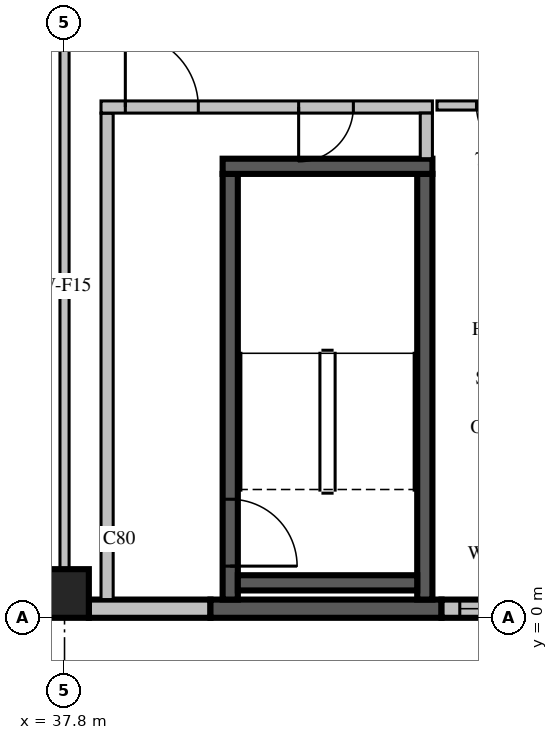
"""IFC4 building model, lengths in metres.
Left out: names, types, materials, properties, quantities, classifications, styles, units other than length and angle.
Written with IfcOpenShell. Run it as: python <this file> out.ifc"""

import sys

from ifc_helpers import new_model, si_unit, direction, frame, frame_2d, origin, origin_2d, place, context, subcontext, project, spatial, rectangle, extrude, source, transform, mapped, element, fill, save


model = new_model("IFC4")
c1 = context("Model", 3, precision=1e-05, world=origin(), true_north=direction((0.0, 1.0)))
c2 = subcontext(c1, "Body", "Model", "MODEL_VIEW")
j1 = project(units=[si_unit("LENGTHUNIT", "METRE"), si_unit("PLANEANGLEUNIT", "RADIAN")], contexts=[c1])
p1 = place(None, origin())
s1 = spatial("IfcSite", under=j1, at=p1, CompositionType="ELEMENT")
p2 = place(p1, origin())
s2 = spatial("IfcBuilding", under=s1, at=p2, CompositionType="ELEMENT")
p3 = place(p2, frame((0.0, 0.0, 242.4)))
s3 = spatial("IfcBuildingStorey", under=s2, at=p3, CompositionType="ELEMENT", Elevation=242.4)
m1 = source(origin(), c2, "Body", "SweptSolid", [
    extrude(rectangle(XDim=0.8, YDim=0.8, at=origin_2d()), origin(), (0.0, 0.0, 1.0), 3.8),
])
p4 = place(p3, frame((37.8, 0.4, 0.0), z_axis=(0.0, 0.0, 1.0), x_axis=(1.0, 0.0, 0.0)))
e1 = element("IfcColumn", 1, at=p4, inside=s3, PredefinedType="COLUMN", context=c2, shape_type="MappedRepresentation", body=[
    mapped(m1, transform((0.0, 0.0, 0.0), scale=1.0)),
])
m2 = source(origin(), c2, "Body", "SweptSolid", [
    extrude(rectangle(XDim=2.0, YDim=0.3, at=frame_2d((1.0, 0.0))), origin(), (0.0, 0.0, 1.0), 3.4),
])
p5 = place(p3, frame((38.2, 0.15, 0.0), z_axis=(0.0, 0.0, 1.0), x_axis=(1.0, 0.0, 0.0)))
e2 = element("IfcWall", 2, at=p5, inside=s3, PredefinedType="STANDARD", context=c2, shape_type="MappedRepresentation", body=[
    mapped(m2, transform((0.0, 0.0, 0.0), scale=1.0)),
])
m3 = source(origin(), c2, "Body", "SweptSolid", [
    extrude(rectangle(XDim=3.8, YDim=0.3, at=frame_2d((1.9, 0.0))), origin(), (0.0, 0.0, 1.0), 3.4),
])
p6 = place(p3, frame((40.2, 0.15, 0.0), z_axis=(0.0, 0.0, 1.0), x_axis=(1.0, 0.0, 0.0)))
e3 = element("IfcWall", 3, at=p6, inside=s3, PredefinedType="SOLIDWALL", context=c2, shape_type="MappedRepresentation", body=[
    mapped(m3, transform((0.0, 0.0, 0.0), scale=1.0)),
])
m4 = source(origin(), c2, "Body", "SweptSolid", [
    extrude(rectangle(XDim=1.8, YDim=0.3, at=frame_2d((0.9, 0.0))), origin(), (0.0, 0.0, 1.0), 3.4),
])
p7 = place(p3, frame((44.0, 0.15, 0.0), z_axis=(0.0, 0.0, 1.0), x_axis=(1.0, 0.0, 0.0)))
e4 = element("IfcWall", 4, at=p7, inside=s3, PredefinedType="STANDARD", context=c2, shape_type="MappedRepresentation", body=[
    mapped(m4, transform((0.0, 0.0, 0.0), scale=1.0)),
])
m5 = source(origin(), c2, "Body", "SweptSolid", [
    extrude(rectangle(XDim=1.2, YDim=2.3, at=frame_2d((0.6, 1.15))), frame((0.0, 0.16, 0.0), z_axis=(0.0, -1.0, 0.0), x_axis=(1.0, 0.0, 0.0)), (0.0, 0.0, 1.0), 0.32),
])
p8 = place(p7, frame((0.3, 0.0, 0.6)))
e5 = element("IfcOpeningElement", 5, at=p8, cuts=e4, PredefinedType="OPENING", context=c2, shape_type="MappedRepresentation", body=[
    mapped(m5, transform((0.0, 0.0, 0.0), scale=1.0)),
])
m6 = source(origin(), c2, "Body", "SweptSolid", [
    extrude(rectangle(XDim=7.0, YDim=0.25, at=frame_2d((3.5, 0.0))), origin(), (0.0, 0.0, 1.0), 3.4),
])
p9 = place(p3, frame((40.525, 0.3, 0.0), z_axis=(0.0, 0.0, 1.0), x_axis=(0.0, 1.0, 0.0)))
e6 = element("IfcWall", 6, at=p9, inside=s3, PredefinedType="SOLIDWALL", context=c2, shape_type="MappedRepresentation", body=[
    mapped(m6, transform((0.0, 0.0, 0.0), scale=1.0)),
])
m7 = source(origin(), c2, "Body", "SweptSolid", [
    extrude(rectangle(XDim=1.1, YDim=2.1, at=frame_2d((0.55, 1.05))), frame((0.0, 0.135, 0.0), z_axis=(0.0, -1.0, 0.0), x_axis=(1.0, 0.0, 0.0)), (0.0, 0.0, 1.0), 0.27),
])
p10 = place(p9, frame((0.55, 0.0, 0.0)))
e7 = element("IfcOpeningElement", 7, at=p10, cuts=e6, PredefinedType="OPENING", context=c2, shape_type="MappedRepresentation", body=[
    mapped(m7, transform((0.0, 0.0, 0.0), scale=1.0)),
])
p11 = place(p3, frame((43.725, 0.3, 0.0), z_axis=(0.0, 0.0, 1.0), x_axis=(0.0, 1.0, 0.0)))
e8 = element("IfcWall", 8, at=p11, inside=s3, PredefinedType="SOLIDWALL", context=c2, shape_type="MappedRepresentation", body=[
    mapped(m6, transform((0.0, 0.0, 0.0), scale=1.0)),
])
m8 = source(origin(), c2, "Body", "SweptSolid", [
    extrude(rectangle(XDim=3.45, YDim=0.25, at=frame_2d((1.725, 0.0))), origin(), (0.0, 0.0, 1.0), 3.4),
])
p12 = place(p3, frame((40.4, 7.425, 0.0), z_axis=(0.0, 0.0, 1.0), x_axis=(1.0, 0.0, 0.0)))
e9 = element("IfcWall", 9, at=p12, inside=s3, PredefinedType="SOLIDWALL", context=c2, shape_type="MappedRepresentation", body=[
    mapped(m8, transform((0.0, 0.0, 0.0), scale=1.0)),
])
m9 = source(origin(), c2, "Body", "SweptSolid", [
    extrude(rectangle(XDim=2.95, YDim=0.25, at=frame_2d((1.475, 0.0))), origin(), (0.0, 0.0, 1.0), 3.4),
])
p13 = place(p3, frame((40.65, 0.575, 0.0), z_axis=(0.0, 0.0, 1.0), x_axis=(1.0, 0.0, 0.0)))
e10 = element("IfcWall", 10, at=p13, inside=s3, PredefinedType="SOLIDWALL", context=c2, shape_type="MappedRepresentation", body=[
    mapped(m9, transform((0.0, 0.0, 0.0), scale=1.0)),
])
m10 = source(origin(), c2, "Body", "SweptSolid", [
    extrude(rectangle(XDim=8.0, YDim=0.2, at=frame_2d((4.0, 0.0))), origin(), (0.0, 0.0, 1.0), 3.4),
])
p14 = place(p3, frame((38.5, 0.3, 0.0), z_axis=(0.0, 0.0, 1.0), x_axis=(0.0, 1.0, 0.0)))
e11 = element("IfcWall", 11, at=p14, inside=s3, PredefinedType="PARTITIONING", context=c2, shape_type="MappedRepresentation", body=[
    mapped(m10, transform((0.0, 0.0, 0.0), scale=1.0)),
])
m11 = source(origin(), c2, "Body", "SweptSolid", [
    extrude(rectangle(XDim=5.45, YDim=0.2, at=frame_2d((2.725, 0.0))), origin(), (0.0, 0.0, 1.0), 3.4),
])
p15 = place(p3, frame((38.4, 8.4, 0.0), z_axis=(0.0, 0.0, 1.0), x_axis=(1.0, 0.0, 0.0)))
e12 = element("IfcWall", 12, at=p15, inside=s3, PredefinedType="PARTITIONING", context=c2, shape_type="MappedRepresentation", body=[
    mapped(m11, transform((0.0, 0.0, 0.0), scale=1.0)),
])
m12 = source(origin(), c2, "Body", "SweptSolid", [
    extrude(rectangle(XDim=1.2, YDim=2.1, at=frame_2d((0.6, 1.05))), frame((0.0, 0.11, 0.0), z_axis=(0.0, -1.0, 0.0), x_axis=(1.0, 0.0, 0.0)), (0.0, 0.0, 1.0), 0.22),
])
p16 = place(p15, frame((0.4, 0.0, 0.0)))
e13 = element("IfcOpeningElement", 13, at=p16, cuts=e12, PredefinedType="OPENING", context=c2, shape_type="MappedRepresentation", body=[
    mapped(m12, transform((0.0, 0.0, 0.0), scale=1.0)),
])
m13 = source(origin(), c2, "Body", "SweptSolid", [
    extrude(rectangle(XDim=0.9, YDim=2.1, at=frame_2d((0.45, 1.05))), frame((0.0, 0.11, 0.0), z_axis=(0.0, -1.0, 0.0), x_axis=(1.0, 0.0, 0.0)), (0.0, 0.0, 1.0), 0.22),
])
p17 = place(p15, frame((3.25, 0.0, 0.0)))
e14 = element("IfcOpeningElement", 14, at=p17, cuts=e12, PredefinedType="OPENING", context=c2, shape_type="MappedRepresentation", body=[
    mapped(m13, transform((0.0, 0.0, 0.0), scale=1.0)),
])
m14 = source(origin(), c2, "Body", "SweptSolid", [
    extrude(rectangle(XDim=0.75, YDim=0.2, at=frame_2d((0.375, 0.0))), origin(), (0.0, 0.0, 1.0), 3.4),
])
p18 = place(p3, frame((43.75, 7.55, 0.0), z_axis=(0.0, 0.0, 1.0), x_axis=(0.0, 1.0, 0.0)))
e15 = element("IfcWall", 15, at=p18, inside=s3, PredefinedType="PARTITIONING", context=c2, shape_type="MappedRepresentation", body=[
    mapped(m14, transform((0.0, 0.0, 0.0), scale=1.0)),
])
m15 = source(origin(), c2, "Body", "SweptSolid", [
    extrude(rectangle(XDim=2.2, YDim=0.15, at=frame_2d((1.1, 0.0))), origin(), (0.0, 0.0, 1.0), 3.4),
])
p19 = place(p3, frame((46.125, 8.425, 0.0), z_axis=(0.0, 0.0, 1.0), x_axis=(-1.0, 0.0, 0.0)))
e16 = element("IfcWall", 16, at=p19, inside=s3, PredefinedType="PARTITIONING", context=c2, shape_type="MappedRepresentation", body=[
    mapped(m15, transform((0.0, 0.0, 0.0), scale=1.0)),
])
m16 = source(origin(), c2, "Body", "SweptSolid", [
    extrude(rectangle(XDim=0.9, YDim=2.1, at=frame_2d((0.45, 1.05))), frame((0.0, 0.085, 0.0), z_axis=(0.0, -1.0, 0.0), x_axis=(1.0, 0.0, 0.0)), (0.0, 0.0, 1.0), 0.17),
])
p20 = place(p19, frame((0.65, 0.0, 0.0)))
e17 = element("IfcOpeningElement", 17, at=p20, cuts=e16, PredefinedType="OPENING", context=c2, shape_type="MappedRepresentation", body=[
    mapped(m16, transform((0.0, 0.0, 0.0), scale=1.0)),
])
m17 = source(origin(), c2, "Body", "SweptSolid", [
    extrude(rectangle(XDim=9.302, YDim=0.15, at=frame_2d((4.651, 0.0))), origin(), (0.0, 0.0, 1.0), 3.4),
])
p21 = place(p3, frame((37.8, 0.799, 0.0), z_axis=(0.0, 0.0, 1.0), x_axis=(0.0, 1.0, 0.0)))
e18 = element("IfcWall", 18, at=p21, inside=s3, PredefinedType="PARTITIONING", context=c2, shape_type="MappedRepresentation", body=[
    mapped(m17, transform((0.0, 0.0, 0.0), scale=1.0)),
])
m18 = source(origin(), c2, "Body", "SweptSolid", [
    extrude(rectangle(XDim=1.2, YDim=2.3, at=frame_2d((0.6, 1.15))), frame((0.0, 0.03, 0.0), z_axis=(0.0, -1.0, 0.0), x_axis=(1.0, 0.0, 0.0)), (0.0, 0.0, 1.0), 0.06),
])
p22 = place(p8, origin())
e19 = element("IfcWindow", 19, at=p22, inside=s3, PartitioningType="SINGLE_PANEL", PredefinedType="WINDOW", context=c2, shape_type="MappedRepresentation", body=[
    mapped(m18, transform((0.0, 0.0, 0.0), scale=1.0)),
])
fill(e5, e19)
m19 = source(origin(), c2, "Body", "SweptSolid", [
    extrude(rectangle(XDim=1.1, YDim=2.1, at=frame_2d((0.55, 1.05))), frame((0.0, 0.025, 0.0), z_axis=(0.0, -1.0, 0.0), x_axis=(1.0, 0.0, 0.0)), (0.0, 0.0, 1.0), 0.05),
])
p23 = place(p10, origin())
e20 = element("IfcDoor", 20, at=p23, inside=s3, OperationType="SINGLE_SWING_RIGHT", PredefinedType="DOOR", context=c2, shape_type="MappedRepresentation", body=[
    mapped(m19, transform((0.0, 0.0, 0.0), scale=1.0)),
])
fill(e7, e20)
m20 = source(origin(), c2, "Body", "SweptSolid", [
    extrude(rectangle(XDim=1.2, YDim=2.1, at=frame_2d((0.6, 1.05))), frame((0.0, 0.025, 0.0), z_axis=(0.0, -1.0, 0.0), x_axis=(1.0, 0.0, 0.0)), (0.0, 0.0, 1.0), 0.05),
])
p24 = place(p16, origin())
e21 = element("IfcDoor", 21, at=p24, inside=s3, OperationType="SINGLE_SWING_LEFT", PredefinedType="DOOR", context=c2, shape_type="MappedRepresentation", body=[
    mapped(m20, transform((0.0, 0.0, 0.0), scale=1.0)),
])
fill(e13, e21)
m21 = source(origin(), c2, "Body", "SweptSolid", [
    extrude(rectangle(XDim=0.9, YDim=2.1, at=frame_2d((0.45, 1.05))), frame((0.0, 0.025, 0.0), z_axis=(0.0, -1.0, 0.0), x_axis=(1.0, 0.0, 0.0)), (0.0, 0.0, 1.0), 0.05),
])
p25 = place(p17, origin())
e22 = element("IfcDoor", 22, at=p25, inside=s3, OperationType="SINGLE_SWING_RIGHT", PredefinedType="DOOR", context=c2, shape_type="MappedRepresentation", body=[
    mapped(m21, transform((0.0, 0.0, 0.0), scale=1.0)),
])
fill(e14, e22)
p26 = place(p20, origin())
e23 = element("IfcDoor", 23, at=p26, inside=s3, OperationType="SINGLE_SWING_LEFT", PredefinedType="DOOR", context=c2, shape_type="MappedRepresentation", body=[
    mapped(m21, transform((0.0, 0.0, 0.0), scale=1.0)),
])
fill(e17, e23)
save(model, sys.argv[1])
